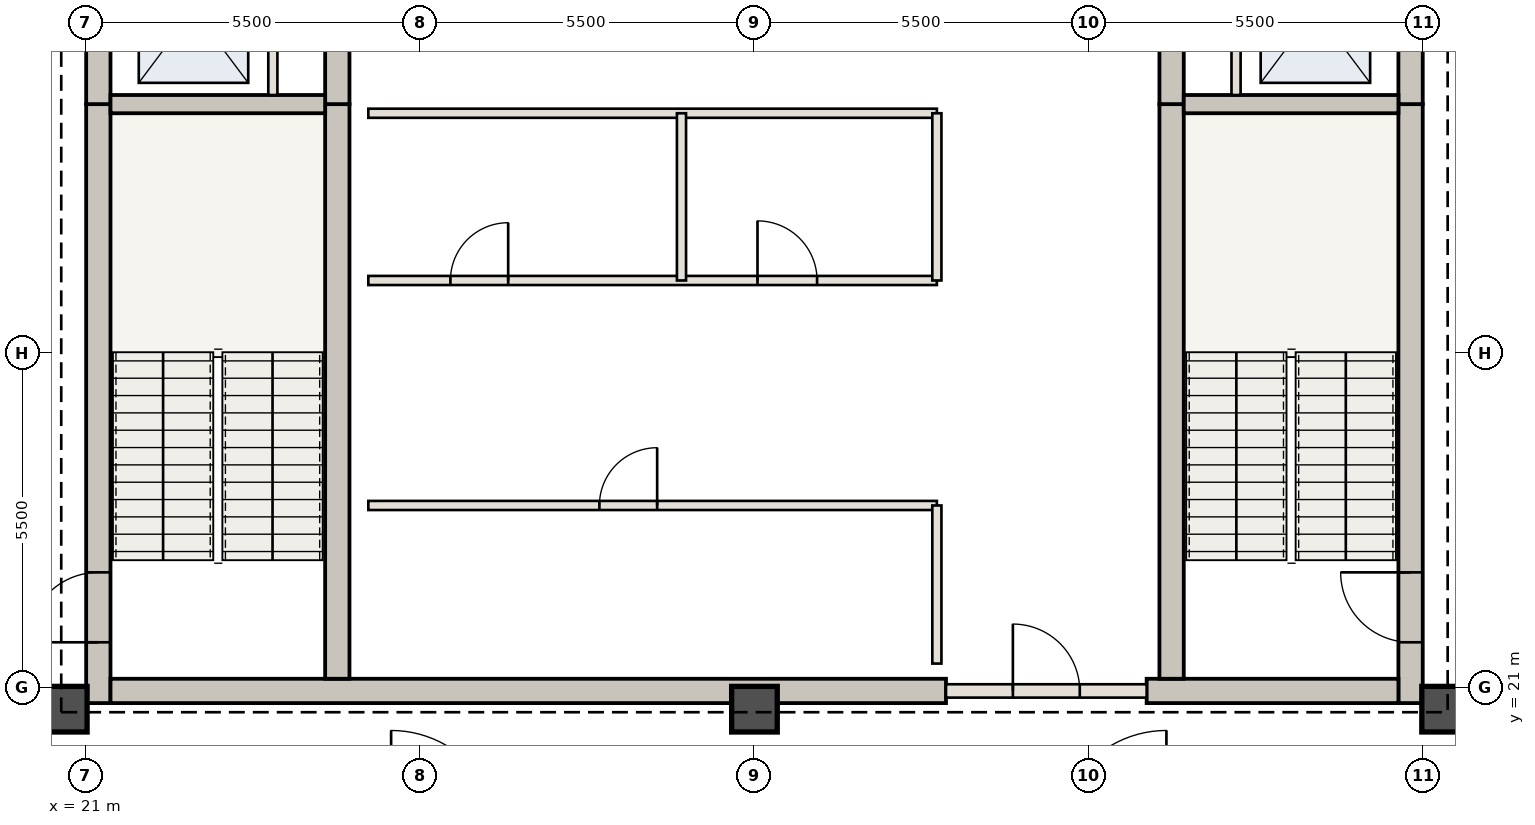
"""IFC4 building model, lengths in metres.
Left out: names, types, materials, properties, quantities, classifications, styles, units other than length and angle.
Written with IfcOpenShell. Run it as: python <this file> out.ifc"""

import sys

from ifc_helpers import new_model, si_unit, direction, frame, frame_2d, origin, origin_2d, place, context, subcontext, project, spatial, rectangle, extrude, element, fill, save


model = new_model("IFC4")
c1 = context("Model", 3, precision=1e-05, world=origin(), true_north=direction((0.0, 1.0)))
c2 = subcontext(c1, "Body", "Model", "MODEL_VIEW")
j1 = project(units=[si_unit("LENGTHUNIT", "METRE"), si_unit("PLANEANGLEUNIT", "RADIAN")], contexts=[c1])
p1 = place(None, origin())
s1 = spatial("IfcSite", under=j1, at=p1, CompositionType="ELEMENT")
p2 = place(p1, origin())
s2 = spatial("IfcBuilding", under=s1, at=p2, CompositionType="ELEMENT")
p3 = place(p2, frame((0.0, 0.0, 257.6)))
s3 = spatial("IfcBuildingStorey", under=s2, at=p3, CompositionType="ELEMENT", Elevation=257.6)
p4 = place(p3, frame((21.21, 20.75, 0.0), z_axis=(0.0, 0.0, 1.0), x_axis=(0.0, 1.0, 0.0)))
e1 = element("IfcWall", 1, at=p4, inside=s3, PredefinedType="SHEAR", context=c2, shape_type="SweptSolid", body=[
    extrude(rectangle(XDim=9.85, YDim=0.4, at=frame_2d((4.925, 0.0))), origin(), (0.0, 0.0, 1.0), 4.55),
])
p5 = place(p4, frame((1.0, 0.0, 0.0)))
e2 = element("IfcOpeningElement", 2, at=p5, cuts=e1, PredefinedType="OPENING", context=c2, shape_type="SweptSolid", body=[
    extrude(rectangle(XDim=1.15, YDim=2.15, at=frame_2d((0.575, 1.075))), frame((0.0, 0.21, 0.0), z_axis=(0.0, -1.0, 0.0), x_axis=(1.0, 0.0, 0.0)), (0.0, 0.0, 1.0), 0.42),
])
p6 = place(p3, frame((21.21, 30.6, 0.0), z_axis=(0.0, 0.0, 1.0), x_axis=(0.0, 1.0, 0.0)))
e3 = element("IfcWall", 3, at=p6, inside=s3, PredefinedType="SHEAR", context=c2, shape_type="SweptSolid", body=[
    extrude(rectangle(XDim=12.6, YDim=0.4, at=frame_2d((6.3, 0.0))), origin(), (0.0, 0.0, 1.0), 4.55),
])
p7 = place(p6, frame((4.2, 0.0, 0.0)))
e4 = element("IfcOpeningElement", 4, at=p7, cuts=e3, PredefinedType="OPENING", context=c2, shape_type="SweptSolid", body=[
    extrude(rectangle(XDim=1.1, YDim=2.15, at=frame_2d((0.55, 1.075))), frame((0.0, 0.21, 0.0), z_axis=(0.0, -1.0, 0.0), x_axis=(1.0, 0.0, 0.0)), (0.0, 0.0, 1.0), 0.42),
])
p8 = place(p6, frame((9.2, 0.0, 0.0)))
e5 = element("IfcOpeningElement", 5, at=p8, cuts=e3, PredefinedType="OPENING", context=c2, shape_type="SweptSolid", body=[
    extrude(rectangle(XDim=0.92, YDim=2.1, at=frame_2d((0.46, 1.05))), frame((0.0, 0.21, 0.0), z_axis=(0.0, -1.0, 0.0), x_axis=(1.0, 0.0, 0.0)), (0.0, 0.0, 1.0), 0.42),
])
p9 = place(p3, frame((42.79, 20.75, 0.0), z_axis=(0.0, 0.0, 1.0), x_axis=(0.0, 1.0, 0.0)))
e6 = element("IfcWall", 6, at=p9, inside=s3, PredefinedType="SHEAR", context=c2, shape_type="SweptSolid", body=[
    extrude(rectangle(XDim=9.85, YDim=0.4, at=frame_2d((4.925, 0.0))), origin(), (0.0, 0.0, 1.0), 4.55),
])
p10 = place(p9, frame((1.0, 0.0, 0.0)))
e7 = element("IfcOpeningElement", 7, at=p10, cuts=e6, PredefinedType="OPENING", context=c2, shape_type="SweptSolid", body=[
    extrude(rectangle(XDim=1.15, YDim=2.15, at=frame_2d((0.575, 1.075))), frame((0.0, 0.21, 0.0), z_axis=(0.0, -1.0, 0.0), x_axis=(1.0, 0.0, 0.0)), (0.0, 0.0, 1.0), 0.42),
])
p11 = place(p3, frame((42.79, 30.6, 0.0), z_axis=(0.0, 0.0, 1.0), x_axis=(0.0, 1.0, 0.0)))
e8 = element("IfcWall", 8, at=p11, inside=s3, PredefinedType="SHEAR", context=c2, shape_type="SweptSolid", body=[
    extrude(rectangle(XDim=12.6, YDim=0.4, at=frame_2d((6.3, 0.0))), origin(), (0.0, 0.0, 1.0), 4.55),
])
p12 = place(p11, frame((4.2, 0.0, 0.0)))
e9 = element("IfcOpeningElement", 9, at=p12, cuts=e8, PredefinedType="OPENING", context=c2, shape_type="SweptSolid", body=[
    extrude(rectangle(XDim=1.1, YDim=2.15, at=frame_2d((0.55, 1.075))), frame((0.0, 0.21, 0.0), z_axis=(0.0, -1.0, 0.0), x_axis=(1.0, 0.0, 0.0)), (0.0, 0.0, 1.0), 0.42),
])
p13 = place(p11, frame((8.05, 0.0, 0.0)))
e10 = element("IfcOpeningElement", 10, at=p13, cuts=e8, PredefinedType="OPENING", context=c2, shape_type="SweptSolid", body=[
    extrude(rectangle(XDim=0.88, YDim=2.1, at=frame_2d((0.44, 1.05))), frame((0.0, 0.21, 0.0), z_axis=(0.0, -1.0, 0.0), x_axis=(1.0, 0.0, 0.0)), (0.0, 0.0, 1.0), 0.42),
])
p14 = place(p11, frame((9.45, 0.0, 0.0)))
e11 = element("IfcOpeningElement", 11, at=p14, cuts=e8, PredefinedType="OPENING", context=c2, shape_type="SweptSolid", body=[
    extrude(rectangle(XDim=0.88, YDim=2.1, at=frame_2d((0.44, 1.05))), frame((0.0, 0.21, 0.0), z_axis=(0.0, -1.0, 0.0), x_axis=(1.0, 0.0, 0.0)), (0.0, 0.0, 1.0), 0.42),
])
p15 = place(p11, frame((10.85, 0.0, 0.0)))
e12 = element("IfcOpeningElement", 12, at=p15, cuts=e8, PredefinedType="OPENING", context=c2, shape_type="SweptSolid", body=[
    extrude(rectangle(XDim=0.88, YDim=2.1, at=frame_2d((0.44, 1.05))), frame((0.0, 0.21, 0.0), z_axis=(0.0, -1.0, 0.0), x_axis=(1.0, 0.0, 0.0)), (0.0, 0.0, 1.0), 0.42),
])
p16 = place(p3, frame((21.41, 20.95, 0.0), z_axis=(0.0, 0.0, 1.0), x_axis=(1.0, 0.0, 0.0)))
e13 = element("IfcWall", 13, at=p16, inside=s3, PredefinedType="SHEAR", context=c2, shape_type="SweptSolid", body=[
    extrude(rectangle(XDim=13.74, YDim=0.4, at=frame_2d((6.87, 0.0))), origin(), (0.0, 0.0, 1.0), 4.55),
])
p17 = place(p3, frame((38.45, 20.95, 0.0), z_axis=(0.0, 0.0, 1.0), x_axis=(1.0, 0.0, 0.0)))
e14 = element("IfcWall", 14, at=p17, inside=s3, PredefinedType="SHEAR", context=c2, shape_type="SweptSolid", body=[
    extrude(rectangle(XDim=4.14, YDim=0.4, at=frame_2d((2.07, 0.0))), origin(), (0.0, 0.0, 1.0), 4.55),
])
p18 = place(p3, frame((25.14, 21.15, 0.0), z_axis=(0.0, 0.0, 1.0), x_axis=(0.0, 1.0, 0.0)))
e15 = element("IfcWall", 15, at=p18, inside=s3, PredefinedType="SHEAR", context=c2, shape_type="SweptSolid", body=[
    extrude(rectangle(XDim=9.45, YDim=0.4, at=frame_2d((4.725, 0.0))), origin(), (0.0, 0.0, 1.0), 4.55),
])
p19 = place(p3, frame((25.14, 30.6, 0.0), z_axis=(0.0, 0.0, 1.0), x_axis=(0.0, 1.0, 0.0)))
e16 = element("IfcWall", 16, at=p19, inside=s3, PredefinedType="SHEAR", context=c2, shape_type="SweptSolid", body=[
    extrude(rectangle(XDim=12.2, YDim=0.4, at=frame_2d((6.1, 0.0))), origin(), (0.0, 0.0, 1.0), 4.55),
])
p20 = place(p19, frame((6.25, 0.0, 0.0)))
e17 = element("IfcOpeningElement", 17, at=p20, cuts=e16, PredefinedType="OPENING", context=c2, shape_type="SweptSolid", body=[
    extrude(rectangle(XDim=1.1, YDim=2.15, at=frame_2d((0.55, 1.075))), frame((0.0, 0.21, 0.0), z_axis=(0.0, -1.0, 0.0), x_axis=(1.0, 0.0, 0.0)), (0.0, 0.0, 1.0), 0.42),
])
p21 = place(p3, frame((38.86, 21.15, 0.0), z_axis=(0.0, 0.0, 1.0), x_axis=(0.0, 1.0, 0.0)))
e18 = element("IfcWall", 18, at=p21, inside=s3, PredefinedType="SHEAR", context=c2, shape_type="SweptSolid", body=[
    extrude(rectangle(XDim=9.45, YDim=0.4, at=frame_2d((4.725, 0.0))), origin(), (0.0, 0.0, 1.0), 4.55),
])
p22 = place(p3, frame((38.86, 30.6, 0.0), z_axis=(0.0, 0.0, 1.0), x_axis=(0.0, 1.0, 0.0)))
e19 = element("IfcWall", 19, at=p22, inside=s3, PredefinedType="SHEAR", context=c2, shape_type="SweptSolid", body=[
    extrude(rectangle(XDim=12.2, YDim=0.4, at=frame_2d((6.1, 0.0))), origin(), (0.0, 0.0, 1.0), 4.55),
])
for number, where, z_axis, x_axis in (
    (20, (20.65, 20.65, 0.0), (0.0, 0.0, 1.0), (1.0, 0.0, 0.0)),
    (21, (32.0, 20.65, 0.0), (0.0, 0.0, 1.0), (1.0, 0.0, 0.0)),
    (22, (43.35, 20.65, 0.0), (0.0, 0.0, 1.0), (1.0, 0.0, 0.0)),
):
    element("IfcColumn", number, at=place(p3, frame(where, z_axis=z_axis, x_axis=x_axis)), inside=s3, PredefinedType="COLUMN", context=c2, shape_type="SweptSolid", body=[
        extrude(rectangle(XDim=0.75, YDim=0.75, at=origin_2d()), origin(), (0.0, 0.0, 1.0), 4.55),
    ])
for number, where, z_axis, x_axis in (
    (23, (21.41, 30.6, 0.0), (0.0, 0.0, 1.0), (1.0, 0.0, 0.0)),
    (24, (39.06, 30.6, 0.0), (0.0, 0.0, 1.0), (1.0, 0.0, 0.0)),
):
    element("IfcWall", number, at=place(p3, frame(where, z_axis=z_axis, x_axis=x_axis)), inside=s3, PredefinedType="SHEAR", context=c2, shape_type="SweptSolid", body=[
        extrude(rectangle(XDim=3.53, YDim=0.3, at=frame_2d((1.765, 0.0))), origin(), (0.0, 0.0, 1.0), 4.13),
    ])
for number, where, z_axis, x_axis in (
    (25, (24.08, 30.75, 0.0), (0.0, 0.0, 1.0), (0.0, 1.0, 0.0)),
    (26, (39.92, 30.75, 0.0), (0.0, 0.0, 1.0), (0.0, 1.0, 0.0)),
):
    element("IfcWall", number, at=place(p3, frame(where, z_axis=z_axis, x_axis=x_axis)), inside=s3, PredefinedType="STANDARD", context=c2, shape_type="SweptSolid", body=[
        extrude(rectangle(XDim=2.65, YDim=0.15, at=frame_2d((1.325, 0.0))), origin(), (0.0, 0.0, 1.0), 4.13),
    ])
p23 = place(p3, frame((35.15, 20.95, 0.0), z_axis=(0.0, 0.0, 1.0), x_axis=(1.0, 0.0, 0.0)))
e27 = element("IfcWall", 27, at=p23, inside=s3, PredefinedType="STANDARD", context=c2, shape_type="SweptSolid", body=[
    extrude(rectangle(XDim=3.3, YDim=0.22, at=frame_2d((1.65, 0.0))), origin(), (0.0, 0.0, 1.0), 4.13),
])
p24 = place(p23, frame((1.1, 0.0, 0.0)))
e28 = element("IfcOpeningElement", 28, at=p24, cuts=e27, PredefinedType="OPENING", context=c2, shape_type="SweptSolid", body=[
    extrude(rectangle(XDim=1.1, YDim=2.15, at=frame_2d((0.55, 1.075))), frame((0.0, 0.12, 0.0), z_axis=(0.0, -1.0, 0.0), x_axis=(1.0, 0.0, 0.0)), (0.0, 0.0, 1.0), 0.24),
])
p25 = place(p3, frame((25.65, 24.0, 0.0), z_axis=(0.0, 0.0, 1.0), x_axis=(1.0, 0.0, 0.0)))
e29 = element("IfcWall", 29, at=p25, inside=s3, PredefinedType="STANDARD", context=c2, shape_type="SweptSolid", body=[
    extrude(rectangle(XDim=9.35, YDim=0.15, at=frame_2d((4.675, 0.0))), origin(), (0.0, 0.0, 1.0), 4.13),
])
p26 = place(p25, frame((3.8, 0.0, 0.0)))
e30 = element("IfcOpeningElement", 30, at=p26, cuts=e29, PredefinedType="OPENING", context=c2, shape_type="SweptSolid", body=[
    extrude(rectangle(XDim=0.95, YDim=2.15, at=frame_2d((0.475, 1.075))), frame((0.0, 0.085, 0.0), z_axis=(0.0, -1.0, 0.0), x_axis=(1.0, 0.0, 0.0)), (0.0, 0.0, 1.0), 0.17),
])
p27 = place(p3, frame((35.0, 21.4, 0.0), z_axis=(0.0, 0.0, 1.0), x_axis=(0.0, 1.0, 0.0)))
e31 = element("IfcWall", 31, at=p27, inside=s3, PredefinedType="STANDARD", context=c2, shape_type="SweptSolid", body=[
    extrude(rectangle(XDim=2.6, YDim=0.15, at=frame_2d((1.3, 0.0))), origin(), (0.0, 0.0, 1.0), 4.13),
])
p28 = place(p3, frame((25.65, 27.7, 0.0), z_axis=(0.0, 0.0, 1.0), x_axis=(1.0, 0.0, 0.0)))
e32 = element("IfcWall", 32, at=p28, inside=s3, PredefinedType="STANDARD", context=c2, shape_type="SweptSolid", body=[
    extrude(rectangle(XDim=9.35, YDim=0.15, at=frame_2d((4.675, 0.0))), origin(), (0.0, 0.0, 1.0), 4.13),
])
p29 = place(p28, frame((1.35, 0.0, 0.0)))
e33 = element("IfcOpeningElement", 33, at=p29, cuts=e32, PredefinedType="OPENING", context=c2, shape_type="SweptSolid", body=[
    extrude(rectangle(XDim=0.95, YDim=2.15, at=frame_2d((0.475, 1.075))), frame((0.0, 0.085, 0.0), z_axis=(0.0, -1.0, 0.0), x_axis=(1.0, 0.0, 0.0)), (0.0, 0.0, 1.0), 0.17),
])
p30 = place(p28, frame((6.4, 0.0, 0.0)))
e34 = element("IfcOpeningElement", 34, at=p30, cuts=e32, PredefinedType="OPENING", context=c2, shape_type="SweptSolid", body=[
    extrude(rectangle(XDim=0.98, YDim=2.2, at=frame_2d((0.49, 1.1))), frame((0.0, 0.085, 0.0), z_axis=(0.0, -1.0, 0.0), x_axis=(1.0, 0.0, 0.0)), (0.0, 0.0, 1.0), 0.17),
])
p31 = place(p3, frame((25.65, 30.45, 0.0), z_axis=(0.0, 0.0, 1.0), x_axis=(1.0, 0.0, 0.0)))
e35 = element("IfcWall", 35, at=p31, inside=s3, PredefinedType="STANDARD", context=c2, shape_type="SweptSolid", body=[
    extrude(rectangle(XDim=9.35, YDim=0.15, at=frame_2d((4.675, 0.0))), origin(), (0.0, 0.0, 1.0), 4.13),
])
for number, where, z_axis, x_axis in (
    (36, (30.8, 27.7, 0.0), (0.0, 0.0, 1.0), (0.0, 1.0, 0.0)),
    (37, (35.0, 27.7, 0.0), (0.0, 0.0, 1.0), (0.0, 1.0, 0.0)),
):
    element("IfcWall", number, at=place(p3, frame(where, z_axis=z_axis, x_axis=x_axis)), inside=s3, PredefinedType="STANDARD", context=c2, shape_type="SweptSolid", body=[
        extrude(rectangle(XDim=2.75, YDim=0.15, at=frame_2d((1.375, 0.0))), origin(), (0.0, 0.0, 1.0), 4.13),
    ])
p32 = place(p5, origin())
e38 = element("IfcDoor", 38, at=p32, inside=s3, OperationType="SINGLE_SWING_LEFT", PredefinedType="DOOR", context=c2, shape_type="SweptSolid", body=[
    extrude(rectangle(XDim=1.15, YDim=2.15, at=frame_2d((0.575, 1.075))), frame((0.0, 0.025, 0.0), z_axis=(0.0, -1.0, 0.0), x_axis=(1.0, 0.0, 0.0)), (0.0, 0.0, 1.0), 0.05),
])
fill(e2, e38)
p33 = place(p10, origin())
e39 = element("IfcDoor", 39, at=p33, inside=s3, OperationType="SINGLE_SWING_RIGHT", PredefinedType="DOOR", context=c2, shape_type="SweptSolid", body=[
    extrude(rectangle(XDim=1.15, YDim=2.15, at=frame_2d((0.575, 1.075))), frame((0.0, 0.025, 0.0), z_axis=(0.0, -1.0, 0.0), x_axis=(1.0, 0.0, 0.0)), (0.0, 0.0, 1.0), 0.05),
])
fill(e7, e39)
p34 = place(p24, origin())
e40 = element("IfcDoor", 40, at=p34, inside=s3, OperationType="SINGLE_SWING_LEFT", PredefinedType="DOOR", context=c2, shape_type="SweptSolid", body=[
    extrude(rectangle(XDim=1.1, YDim=2.15, at=frame_2d((0.55, 1.075))), frame((0.0, 0.025, 0.0), z_axis=(0.0, -1.0, 0.0), x_axis=(1.0, 0.0, 0.0)), (0.0, 0.0, 1.0), 0.05),
])
fill(e28, e40)
p35 = place(p26, origin())
e41 = element("IfcDoor", 41, at=p35, inside=s3, OperationType="SINGLE_SWING_RIGHT", PredefinedType="DOOR", context=c2, shape_type="SweptSolid", body=[
    extrude(rectangle(XDim=0.95, YDim=2.15, at=frame_2d((0.475, 1.075))), frame((0.0, 0.025, 0.0), z_axis=(0.0, -1.0, 0.0), x_axis=(1.0, 0.0, 0.0)), (0.0, 0.0, 1.0), 0.05),
])
fill(e30, e41)
p36 = place(p29, origin())
e42 = element("IfcDoor", 42, at=p36, inside=s3, OperationType="SINGLE_SWING_RIGHT", PredefinedType="DOOR", context=c2, shape_type="SweptSolid", body=[
    extrude(rectangle(XDim=0.95, YDim=2.15, at=frame_2d((0.475, 1.075))), frame((0.0, 0.025, 0.0), z_axis=(0.0, -1.0, 0.0), x_axis=(1.0, 0.0, 0.0)), (0.0, 0.0, 1.0), 0.05),
])
fill(e33, e42)
p37 = place(p30, origin())
e43 = element("IfcDoor", 43, at=p37, inside=s3, OperationType="SINGLE_SWING_LEFT", PredefinedType="DOOR", context=c2, shape_type="SweptSolid", body=[
    extrude(rectangle(XDim=0.98, YDim=2.2, at=frame_2d((0.49, 1.1))), frame((0.0, 0.025, 0.0), z_axis=(0.0, -1.0, 0.0), x_axis=(1.0, 0.0, 0.0)), (0.0, 0.0, 1.0), 0.05),
])
fill(e34, e43)
save(model, sys.argv[1])
